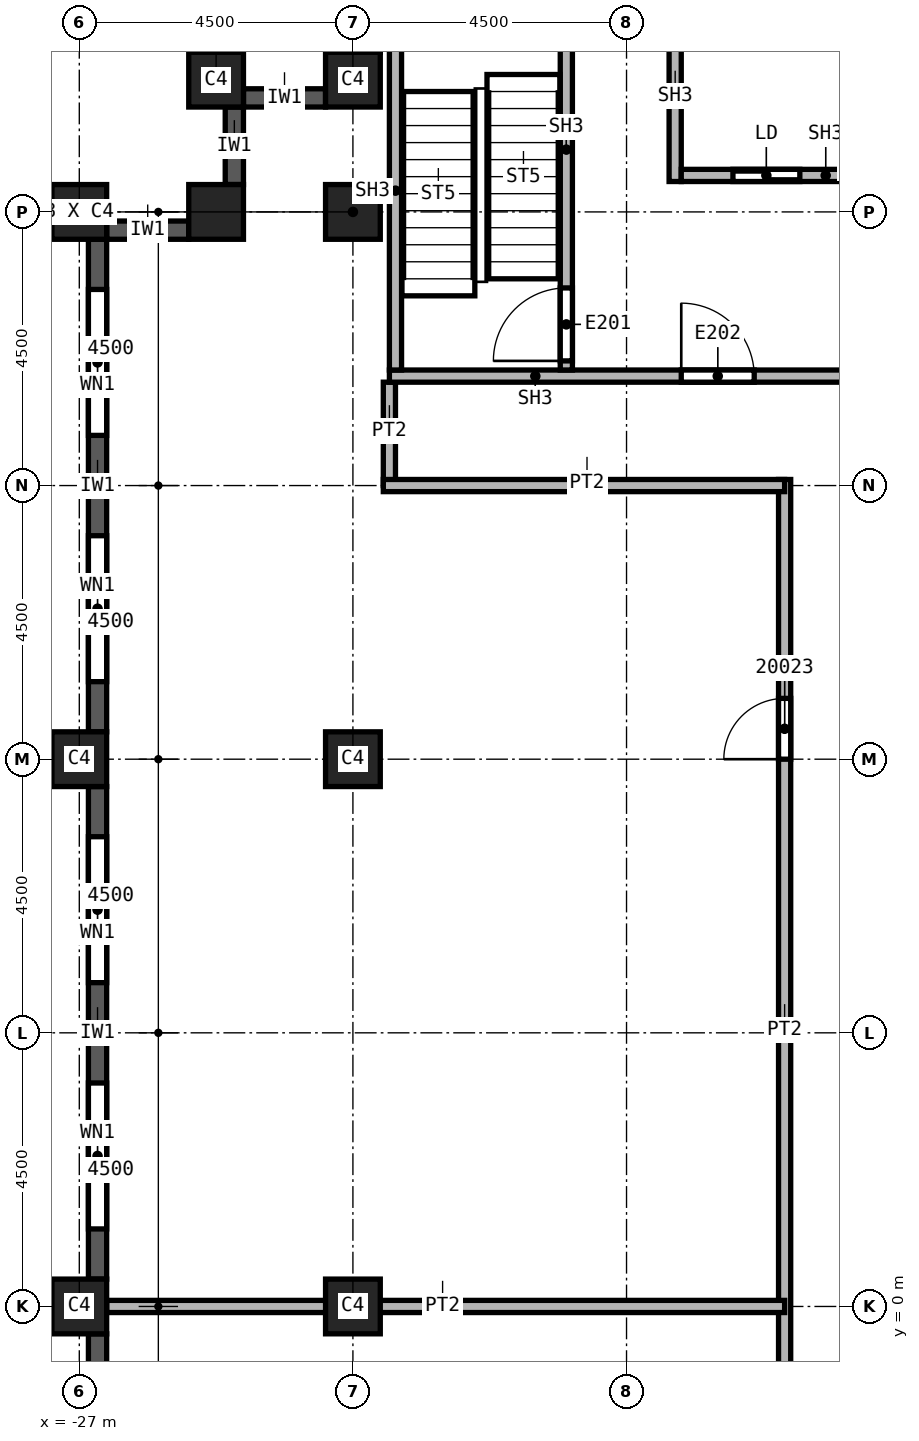
"""IFC4 building model, lengths in metres.
Left out: names, types, materials, properties, quantities, classifications, styles, units other than length and angle.
Written with IfcOpenShell. Run it as: python <this file> out.ifc"""

import sys

from ifc_helpers import new_model, si_unit, direction, frame, frame_2d, origin, origin_2d, place, context, subcontext, project, spatial, rectangle, extrude, element, fill, save


model = new_model("IFC4")
c1 = context("Model", 3, precision=1e-05, world=origin(), true_north=direction((0.0, 1.0)))
c2 = subcontext(c1, "Body", "Model", "MODEL_VIEW")
j1 = project(units=[si_unit("LENGTHUNIT", "METRE"), si_unit("PLANEANGLEUNIT", "RADIAN")], contexts=[c1])
p1 = place(None, origin())
s1 = spatial("IfcSite", under=j1, at=p1, CompositionType="ELEMENT")
p2 = place(p1, origin())
s2 = spatial("IfcBuilding", under=s1, at=p2, CompositionType="ELEMENT")
p3 = place(p2, frame((0.0, 0.0, 290.0)))
s3 = spatial("IfcBuildingStorey", under=s2, at=p3, CompositionType="ELEMENT", Elevation=290.0)
for number, where, z_axis, x_axis in (
    (1, (-22.5, 0.0, 0.0), (0.0, 0.0, 1.0), (1.0, 0.0, 0.0)),
    (2, (-22.5, 9.0, 0.0), (0.0, 0.0, 1.0), (1.0, 0.0, 0.0)),
    (3, (-22.5, 18.0, 0.0), (0.0, 0.0, 1.0), (1.0, 0.0, 0.0)),
    (4, (-27.0, 0.0, 0.0), (0.0, 0.0, 1.0), (0.0, 1.0, 0.0)),
    (5, (-27.0, 9.0, 0.0), (0.0, 0.0, 1.0), (0.0, 1.0, 0.0)),
    (6, (-27.0, 18.0, 0.0), (0.0, 0.0, 1.0), (0.0, 1.0, 0.0)),
    (7, (-22.5, 20.175, 0.0), (0.0, 0.0, 1.0), (1.0, 0.0, 0.0)),
    (8, (-24.75, 20.175, 0.0), (0.0, 0.0, 1.0), (1.0, 0.0, 0.0)),
    (9, (-24.75, 18.0, 0.0), (0.0, 0.0, 1.0), (1.0, 0.0, 0.0)),
):
    element("IfcColumn", number, at=place(p3, frame(where, z_axis=z_axis, x_axis=x_axis)), inside=s3, PredefinedType="COLUMN", context=c2, shape_type="SweptSolid", body=[
        extrude(rectangle(XDim=0.9, YDim=0.9, at=origin_2d()), origin(), (0.0, 0.0, 1.0), 3.59),
    ])
p4 = place(p3, frame((-24.45, 19.725, 0.0), z_axis=(0.0, 0.0, 1.0), x_axis=(0.0, -1.0, 0.0)))
e10 = element("IfcWall", 10, at=p4, inside=s3, PredefinedType="SOLIDWALL", context=c2, shape_type="SweptSolid", body=[
    extrude(rectangle(XDim=1.275, YDim=0.3, at=frame_2d((0.638, 0.0))), origin(), (0.0, 0.0, 1.0), 2.99),
])
p5 = place(p3, frame((-25.2, 17.7, 0.0), z_axis=(0.0, 0.0, 1.0), x_axis=(-1.0, 0.0, 0.0)))
e11 = element("IfcWall", 11, at=p5, inside=s3, PredefinedType="SOLIDWALL", context=c2, shape_type="SweptSolid", body=[
    extrude(rectangle(XDim=1.35, YDim=0.3, at=frame_2d((0.675, 0.0))), origin(), (0.0, 0.0, 1.0), 2.99),
])
p6 = place(p3, frame((-26.7, 17.55, 0.0), z_axis=(0.0, 0.0, 1.0), x_axis=(0.0, -1.0, 0.0)))
e12 = element("IfcWall", 12, at=p6, inside=s3, PredefinedType="SOLIDWALL", context=c2, shape_type="SweptSolid", body=[
    extrude(rectangle(XDim=8.1, YDim=0.3, at=frame_2d((4.05, 0.0))), origin(), (0.0, 0.0, 1.0), 2.99),
])
p7 = place(p6, frame((0.825, 0.0, 0.8)))
e13 = element("IfcOpeningElement", 13, at=p7, cuts=e12, PredefinedType="OPENING", context=c2, shape_type="SweptSolid", body=[
    extrude(rectangle(XDim=2.4, YDim=1.95, at=frame_2d((1.2, 0.975))), frame((0.0, 0.15, 0.0), z_axis=(0.0, -1.0, 0.0), x_axis=(1.0, 0.0, 0.0)), (0.0, 0.0, 1.0), 0.3),
])
p8 = place(p6, frame((4.875, 0.0, 0.8)))
e14 = element("IfcOpeningElement", 14, at=p8, cuts=e12, PredefinedType="OPENING", context=c2, shape_type="SweptSolid", body=[
    extrude(rectangle(XDim=2.4, YDim=1.95, at=frame_2d((1.2, 0.975))), frame((0.0, 0.15, 0.0), z_axis=(0.0, -1.0, 0.0), x_axis=(1.0, 0.0, 0.0)), (0.0, 0.0, 1.0), 0.3),
])
p9 = place(p3, frame((-26.7, 8.55, 0.0), z_axis=(0.0, 0.0, 1.0), x_axis=(0.0, -1.0, 0.0)))
e15 = element("IfcWall", 15, at=p9, inside=s3, PredefinedType="SOLIDWALL", context=c2, shape_type="SweptSolid", body=[
    extrude(rectangle(XDim=8.1, YDim=0.3, at=frame_2d((4.05, 0.0))), origin(), (0.0, 0.0, 1.0), 2.99),
])
p10 = place(p9, frame((0.825, 0.0, 0.8)))
e16 = element("IfcOpeningElement", 16, at=p10, cuts=e15, PredefinedType="OPENING", context=c2, shape_type="SweptSolid", body=[
    extrude(rectangle(XDim=2.4, YDim=1.95, at=frame_2d((1.2, 0.975))), frame((0.0, 0.15, 0.0), z_axis=(0.0, -1.0, 0.0), x_axis=(1.0, 0.0, 0.0)), (0.0, 0.0, 1.0), 0.3),
])
p11 = place(p9, frame((4.875, 0.0, 0.8)))
e17 = element("IfcOpeningElement", 17, at=p11, cuts=e15, PredefinedType="OPENING", context=c2, shape_type="SweptSolid", body=[
    extrude(rectangle(XDim=2.4, YDim=1.95, at=frame_2d((1.2, 0.975))), frame((0.0, 0.15, 0.0), z_axis=(0.0, -1.0, 0.0), x_axis=(1.0, 0.0, 0.0)), (0.0, 0.0, 1.0), 0.3),
])
p12 = place(p3, frame((-26.7, -0.45, 0.0), z_axis=(0.0, 0.0, 1.0), x_axis=(0.0, -1.0, 0.0)))
e18 = element("IfcWall", 18, at=p12, inside=s3, PredefinedType="SOLIDWALL", context=c2, shape_type="SweptSolid", body=[
    extrude(rectangle(XDim=8.1, YDim=0.3, at=frame_2d((4.05, 0.0))), origin(), (0.0, 0.0, 1.0), 2.99),
])
p13 = place(p12, frame((0.825, 0.0, 0.8)))
e19 = element("IfcOpeningElement", 19, at=p13, cuts=e18, PredefinedType="OPENING", context=c2, shape_type="SweptSolid", body=[
    extrude(rectangle(XDim=2.4, YDim=1.95, at=frame_2d((1.2, 0.975))), frame((0.0, 0.15, 0.0), z_axis=(0.0, -1.0, 0.0), x_axis=(1.0, 0.0, 0.0)), (0.0, 0.0, 1.0), 0.3),
])
p14 = place(p12, frame((4.875, 0.0, 0.8)))
e20 = element("IfcOpeningElement", 20, at=p14, cuts=e18, PredefinedType="OPENING", context=c2, shape_type="SweptSolid", body=[
    extrude(rectangle(XDim=2.4, YDim=1.95, at=frame_2d((1.2, 0.975))), frame((0.0, 0.15, 0.0), z_axis=(0.0, -1.0, 0.0), x_axis=(1.0, 0.0, 0.0)), (0.0, 0.0, 1.0), 0.3),
])
p15 = place(p3, frame((-22.95, 19.875, 0.0), z_axis=(0.0, 0.0, 1.0), x_axis=(-1.0, 0.0, 0.0)))
e21 = element("IfcWall", 21, at=p15, inside=s3, PredefinedType="SOLIDWALL", context=c2, shape_type="SweptSolid", body=[
    extrude(rectangle(XDim=1.35, YDim=0.3, at=frame_2d((0.675, 0.0))), origin(), (0.0, 0.0, 1.0), 2.99),
])
p16 = place(p3, frame((-21.9, 13.5, 0.0), z_axis=(0.0, 0.0, 1.0), x_axis=(0.0, 1.0, 0.0)))
e22 = element("IfcWall", 22, at=p16, inside=s3, PredefinedType="PARTITIONING", context=c2, shape_type="SweptSolid", body=[
    extrude(rectangle(XDim=1.7, YDim=0.2, at=frame_2d((0.85, 0.0))), origin(), (0.0, 0.0, 1.0), 3.59),
])
p17 = place(p3, frame((-15.4, -21.9, 0.0), z_axis=(0.0, 0.0, 1.0), x_axis=(0.0, 1.0, 0.0)))
e23 = element("IfcWall", 23, at=p17, inside=s3, PredefinedType="PARTITIONING", context=c2, shape_type="SweptSolid", body=[
    extrude(rectangle(XDim=35.5, YDim=0.2, at=frame_2d((17.75, 0.0))), origin(), (0.0, 0.0, 1.0), 3.59),
])
p18 = place(p17, frame((30.9, 0.0, 0.0)))
e24 = element("IfcOpeningElement", 24, at=p18, cuts=e23, PredefinedType="OPENING", context=c2, shape_type="SweptSolid", body=[
    extrude(rectangle(XDim=1.0, YDim=2.1, at=frame_2d((0.5, 1.05))), frame((0.0, 0.1, 0.0), z_axis=(0.0, -1.0, 0.0), x_axis=(1.0, 0.0, 0.0)), (0.0, 0.0, 1.0), 0.2),
])
p19 = place(p17, frame((2.65, 0.0, 0.0)))
e25 = element("IfcOpeningElement", 25, at=p19, cuts=e23, PredefinedType="OPENING", context=c2, shape_type="SweptSolid", body=[
    extrude(rectangle(XDim=1.0, YDim=2.1, at=frame_2d((0.5, 1.05))), frame((0.0, 0.1, 0.0), z_axis=(0.0, -1.0, 0.0), x_axis=(1.0, 0.0, 0.0)), (0.0, 0.0, 1.0), 0.2),
])
p20 = place(p17, frame((7.65, 0.0, 0.0)))
e26 = element("IfcOpeningElement", 26, at=p20, cuts=e23, PredefinedType="OPENING", context=c2, shape_type="SweptSolid", body=[
    extrude(rectangle(XDim=1.0, YDim=2.1, at=frame_2d((0.5, 1.05))), frame((0.0, 0.1, 0.0), z_axis=(0.0, -1.0, 0.0), x_axis=(1.0, 0.0, 0.0)), (0.0, 0.0, 1.0), 0.2),
])
p21 = place(p17, frame((14.7, 0.0, 0.0)))
e27 = element("IfcOpeningElement", 27, at=p21, cuts=e23, PredefinedType="OPENING", context=c2, shape_type="SweptSolid", body=[
    extrude(rectangle(XDim=1.0, YDim=2.1, at=frame_2d((0.5, 1.05))), frame((0.0, 0.1, 0.0), z_axis=(0.0, -1.0, 0.0), x_axis=(1.0, 0.0, 0.0)), (0.0, 0.0, 1.0), 0.2),
])
p22 = place(p17, frame((18.3, 0.0, 0.0)))
e28 = element("IfcOpeningElement", 28, at=p22, cuts=e23, PredefinedType="OPENING", context=c2, shape_type="SweptSolid", body=[
    extrude(rectangle(XDim=1.0, YDim=2.1, at=frame_2d((0.5, 1.05))), frame((0.0, 0.1, 0.0), z_axis=(0.0, -1.0, 0.0), x_axis=(1.0, 0.0, 0.0)), (0.0, 0.0, 1.0), 0.2),
])
p23 = place(p3, frame((-15.4, 0.0, 0.0), z_axis=(0.0, 0.0, 1.0), x_axis=(-1.0, 0.0, 0.0)))
e29 = element("IfcWall", 29, at=p23, inside=s3, PredefinedType="PARTITIONING", context=c2, shape_type="SweptSolid", body=[
    extrude(rectangle(XDim=11.15, YDim=0.2, at=frame_2d((5.575, 0.0))), origin(), (0.0, 0.0, 1.0), 3.59),
])
p24 = place(p3, frame((-15.4, 13.5, 0.0), z_axis=(0.0, 0.0, 1.0), x_axis=(-1.0, 0.0, 0.0)))
e30 = element("IfcWall", 30, at=p24, inside=s3, PredefinedType="PARTITIONING", context=c2, shape_type="SweptSolid", body=[
    extrude(rectangle(XDim=6.6, YDim=0.2, at=frame_2d((3.3, 0.0))), origin(), (0.0, 0.0, 1.0), 3.59),
])
p25 = place(p3, frame((-21.9, 15.3, 0.0), z_axis=(0.0, 0.0, 1.0), x_axis=(1.0, 0.0, 0.0)))
e31 = element("IfcWall", 31, at=p25, inside=s3, PredefinedType="SOLIDWALL", context=c2, shape_type="SweptSolid", body=[
    extrude(rectangle(XDim=8.275, YDim=0.2, at=frame_2d((4.137, 0.0))), origin(), (0.0, 0.0, 1.0), 3.59),
])
p26 = place(p25, frame((4.8, 0.0, 0.0)))
e32 = element("IfcOpeningElement", 32, at=p26, cuts=e31, PredefinedType="OPENING", context=c2, shape_type="SweptSolid", body=[
    extrude(rectangle(XDim=1.2, YDim=2.1, at=frame_2d((0.6, 1.05))), frame((0.0, 0.1, 0.0), z_axis=(0.0, -1.0, 0.0), x_axis=(1.0, 0.0, 0.0)), (0.0, 0.0, 1.0), 0.2),
])
p27 = place(p3, frame((-21.8, 15.4, 0.0), z_axis=(0.0, 0.0, 1.0), x_axis=(0.0, 1.0, 0.0)))
e33 = element("IfcWall", 33, at=p27, inside=s3, PredefinedType="SOLIDWALL", context=c2, shape_type="SweptSolid", body=[
    extrude(rectangle(XDim=5.9, YDim=0.2, at=frame_2d((2.95, 0.0))), origin(), (0.0, 0.0, 1.0), 3.59),
])
p28 = place(p3, frame((-18.99, 15.4, 0.0), z_axis=(0.0, 0.0, 1.0), x_axis=(0.0, 1.0, 0.0)))
e34 = element("IfcWall", 34, at=p28, inside=s3, PredefinedType="SOLIDWALL", context=c2, shape_type="SweptSolid", body=[
    extrude(rectangle(XDim=5.9, YDim=0.2, at=frame_2d((2.95, 0.0))), origin(), (0.0, 0.0, 1.0), 3.59),
])
p29 = place(p28, frame((0.15, 0.0, 0.0)))
e35 = element("IfcOpeningElement", 35, at=p29, cuts=e34, PredefinedType="OPENING", context=c2, shape_type="SweptSolid", body=[
    extrude(rectangle(XDim=1.2, YDim=2.1, at=frame_2d((0.6, 1.05))), frame((0.0, 0.1, 0.0), z_axis=(0.0, -1.0, 0.0), x_axis=(1.0, 0.0, 0.0)), (0.0, 0.0, 1.0), 0.2),
])
p30 = place(p3, frame((-17.2, 18.5, 0.0), z_axis=(0.0, 0.0, 1.0), x_axis=(0.0, 1.0, 0.0)))
e36 = element("IfcWall", 36, at=p30, inside=s3, PredefinedType="SOLIDWALL", context=c2, shape_type="SweptSolid", body=[
    extrude(rectangle(XDim=2.8, YDim=0.2, at=frame_2d((1.4, 0.0))), origin(), (0.0, 0.0, 1.0), 3.59),
])
p31 = place(p3, frame((-17.1, 18.6, 0.0), z_axis=(0.0, 0.0, 1.0), x_axis=(1.0, 0.0, 0.0)))
e37 = element("IfcWall", 37, at=p31, inside=s3, PredefinedType="SOLIDWALL", context=c2, shape_type="SweptSolid", body=[
    extrude(rectangle(XDim=2.8, YDim=0.2, at=frame_2d((1.4, 0.0))), origin(), (0.0, 0.0, 1.0), 3.59),
])
p32 = place(p31, frame((0.85, 0.0, 0.0)))
e38 = element("IfcOpeningElement", 38, at=p32, cuts=e37, PredefinedType="OPENING", context=c2, shape_type="SweptSolid", body=[
    extrude(rectangle(XDim=1.1, YDim=2.1, at=frame_2d((0.55, 1.05))), frame((0.0, 0.1, 0.0), z_axis=(0.0, -1.0, 0.0), x_axis=(1.0, 0.0, 0.0)), (0.0, 0.0, 1.0), 0.2),
])
p33 = place(p7, origin())
e39 = element("IfcWindow", 39, at=p33, inside=s3, PartitioningType="SINGLE_PANEL", PredefinedType="WINDOW", context=c2, shape_type="SweptSolid", body=[
    extrude(rectangle(XDim=2.4, YDim=1.95, at=frame_2d((1.2, 0.975))), frame((0.0, 0.03, 0.0), z_axis=(0.0, -1.0, 0.0), x_axis=(1.0, 0.0, 0.0)), (0.0, 0.0, 1.0), 0.06),
])
fill(e13, e39)
p34 = place(p8, origin())
e40 = element("IfcWindow", 40, at=p34, inside=s3, PartitioningType="SINGLE_PANEL", PredefinedType="WINDOW", context=c2, shape_type="SweptSolid", body=[
    extrude(rectangle(XDim=2.4, YDim=1.95, at=frame_2d((1.2, 0.975))), frame((0.0, 0.03, 0.0), z_axis=(0.0, -1.0, 0.0), x_axis=(1.0, 0.0, 0.0)), (0.0, 0.0, 1.0), 0.06),
])
fill(e14, e40)
p35 = place(p10, origin())
e41 = element("IfcWindow", 41, at=p35, inside=s3, PartitioningType="SINGLE_PANEL", PredefinedType="WINDOW", context=c2, shape_type="SweptSolid", body=[
    extrude(rectangle(XDim=2.4, YDim=1.95, at=frame_2d((1.2, 0.975))), frame((0.0, 0.03, 0.0), z_axis=(0.0, -1.0, 0.0), x_axis=(1.0, 0.0, 0.0)), (0.0, 0.0, 1.0), 0.06),
])
fill(e16, e41)
p36 = place(p11, origin())
e42 = element("IfcWindow", 42, at=p36, inside=s3, PartitioningType="SINGLE_PANEL", PredefinedType="WINDOW", context=c2, shape_type="SweptSolid", body=[
    extrude(rectangle(XDim=2.4, YDim=1.95, at=frame_2d((1.2, 0.975))), frame((0.0, 0.03, 0.0), z_axis=(0.0, -1.0, 0.0), x_axis=(1.0, 0.0, 0.0)), (0.0, 0.0, 1.0), 0.06),
])
fill(e17, e42)
p37 = place(p18, origin())
e43 = element("IfcDoor", 43, at=p37, inside=s3, OperationType="SINGLE_SWING_RIGHT", PredefinedType="DOOR", context=c2, shape_type="SweptSolid", body=[
    extrude(rectangle(XDim=1.0, YDim=2.1, at=frame_2d((0.5, 1.05))), frame((0.0, 0.025, 0.0), z_axis=(0.0, -1.0, 0.0), x_axis=(1.0, 0.0, 0.0)), (0.0, 0.0, 1.0), 0.05),
])
fill(e24, e43)
p38 = place(p29, origin())
e44 = element("IfcDoor", 44, at=p38, inside=s3, OperationType="SINGLE_SWING_LEFT", PredefinedType="DOOR", context=c2, shape_type="SweptSolid", body=[
    extrude(rectangle(XDim=1.2, YDim=2.1, at=frame_2d((0.6, 1.05))), frame((0.0, 0.025, 0.0), z_axis=(0.0, -1.0, 0.0), x_axis=(1.0, 0.0, 0.0)), (0.0, 0.0, 1.0), 0.05),
])
fill(e35, e44)
p39 = place(p32, origin())
e45 = element("IfcDoor", 45, at=p39, inside=s3, OperationType="SLIDING_TO_LEFT", PredefinedType="DOOR", context=c2, shape_type="SweptSolid", body=[
    extrude(rectangle(XDim=1.1, YDim=2.1, at=frame_2d((0.55, 1.05))), frame((0.0, 0.025, 0.0), z_axis=(0.0, -1.0, 0.0), x_axis=(1.0, 0.0, 0.0)), (0.0, 0.0, 1.0), 0.05),
])
fill(e38, e45)
p40 = place(p26, origin())
e46 = element("IfcDoor", 46, at=p40, inside=s3, OperationType="SINGLE_SWING_RIGHT", PredefinedType="DOOR", context=c2, shape_type="SweptSolid", body=[
    extrude(rectangle(XDim=1.2, YDim=2.1, at=frame_2d((0.6, 1.05))), frame((0.0, 0.025, 0.0), z_axis=(0.0, -1.0, 0.0), x_axis=(1.0, 0.0, 0.0)), (0.0, 0.0, 1.0), 0.05),
])
fill(e32, e46)
save(model, sys.argv[1])
